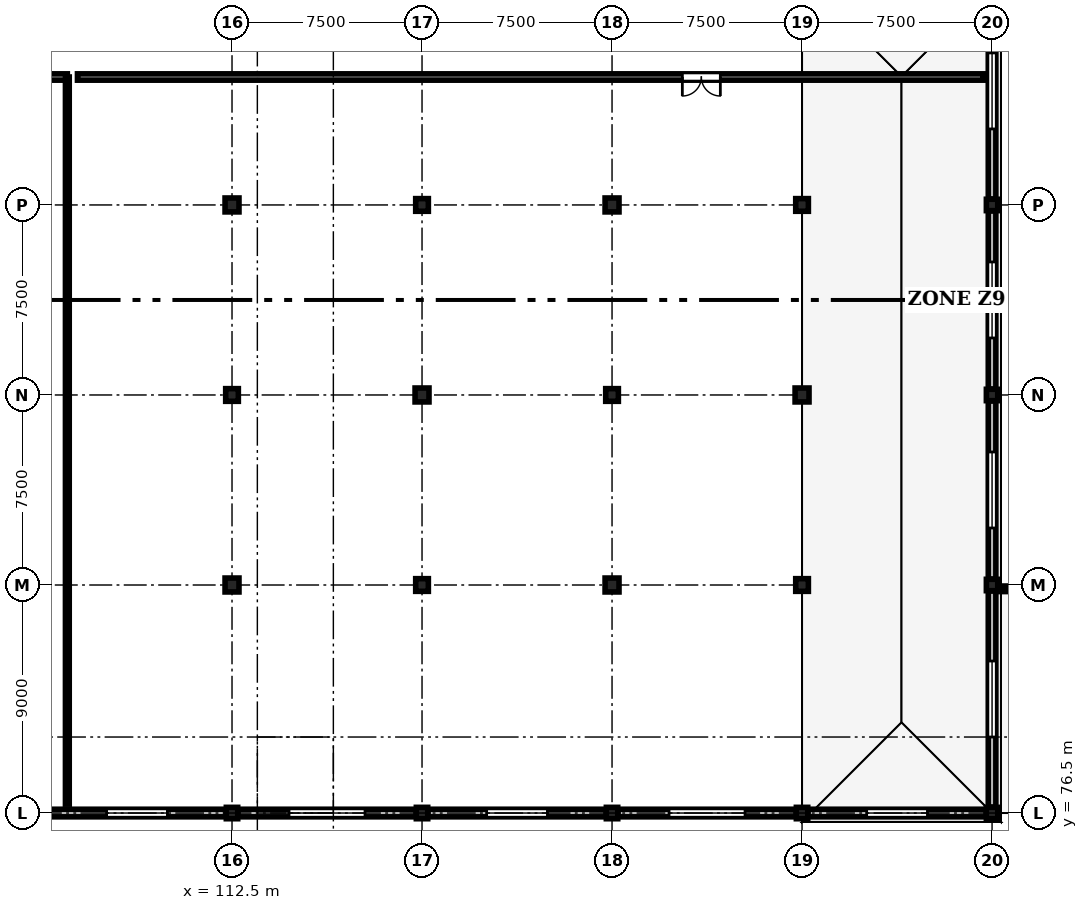
"""IFC4 building model, lengths in metres.
Left out: names, types, materials, properties, quantities, classifications, styles, units other than length and angle.
Written with IfcOpenShell. Run it as: python <this file> out.ifc"""

import sys

from ifc_helpers import new_model, si_unit, direction, frame, frame_2d, origin, origin_2d, place, context, subcontext, project, spatial, rectangle, extrude, element, fill, save


model = new_model("IFC4")
c1 = context("Model", 3, precision=1e-05, world=origin(), true_north=direction((0.0, 1.0)))
c2 = subcontext(c1, "Body", "Model", "MODEL_VIEW")
j1 = project(units=[si_unit("LENGTHUNIT", "METRE"), si_unit("PLANEANGLEUNIT", "RADIAN")], contexts=[c1])
p1 = place(None, origin())
s1 = spatial("IfcSite", under=j1, at=p1, CompositionType="ELEMENT")
p2 = place(p1, origin())
s2 = spatial("IfcBuilding", under=s1, at=p2, CompositionType="ELEMENT")
p3 = place(p2, frame((0.0, 0.0, 14.1)))
s3 = spatial("IfcBuildingStorey", under=s2, at=p3, CompositionType="ELEMENT", Elevation=14.1)
p4 = place(p3, frame((112.5, 76.5, 0.0), z_axis=(0.0, 0.0, 1.0), x_axis=(1.0, 0.0, 0.0)))
e1 = element("IfcColumn", 1, at=p4, inside=s3, PredefinedType="COLUMN", context=c2, shape_type="SweptSolid", body=[
    extrude(rectangle(XDim=0.45, YDim=0.45, at=origin_2d()), origin(), (0.0, 0.0, 1.0), 3.75),
])
p5 = place(p3, frame((112.5, 85.5, 0.0), z_axis=(0.0, 0.0, 1.0), x_axis=(1.0, 0.0, 0.0)))
e2 = element("IfcColumn", 2, at=p5, inside=s3, PredefinedType="COLUMN", context=c2, shape_type="SweptSolid", body=[
    extrude(rectangle(XDim=0.55, YDim=0.55, at=origin_2d()), origin(), (0.0, 0.0, 1.0), 3.75),
])
p6 = place(p3, frame((112.5, 93.0, 0.0), z_axis=(0.0, 0.0, 1.0), x_axis=(1.0, 0.0, 0.0)))
e3 = element("IfcColumn", 3, at=p6, inside=s3, PredefinedType="COLUMN", context=c2, shape_type="SweptSolid", body=[
    extrude(rectangle(XDim=0.5, YDim=0.5, at=origin_2d()), origin(), (0.0, 0.0, 1.0), 3.75),
])
p7 = place(p3, frame((112.5, 100.5, 0.0), z_axis=(0.0, 0.0, 1.0), x_axis=(1.0, 0.0, 0.0)))
e4 = element("IfcColumn", 4, at=p7, inside=s3, PredefinedType="COLUMN", context=c2, shape_type="SweptSolid", body=[
    extrude(rectangle(XDim=0.55, YDim=0.55, at=origin_2d()), origin(), (0.0, 0.0, 1.0), 3.75),
])
p8 = place(p3, frame((120.0, 76.5, 0.0), z_axis=(0.0, 0.0, 1.0), x_axis=(1.0, 0.0, 0.0)))
e5 = element("IfcColumn", 5, at=p8, inside=s3, PredefinedType="COLUMN", context=c2, shape_type="SweptSolid", body=[
    extrude(rectangle(XDim=0.45, YDim=0.45, at=origin_2d()), origin(), (0.0, 0.0, 1.0), 3.75),
])
p9 = place(p3, frame((120.0, 85.5, 0.0), z_axis=(0.0, 0.0, 1.0), x_axis=(1.0, 0.0, 0.0)))
e6 = element("IfcColumn", 6, at=p9, inside=s3, PredefinedType="COLUMN", context=c2, shape_type="SweptSolid", body=[
    extrude(rectangle(XDim=0.5, YDim=0.5, at=origin_2d()), origin(), (0.0, 0.0, 1.0), 3.75),
])
p10 = place(p3, frame((120.0, 93.0, 0.0), z_axis=(0.0, 0.0, 1.0), x_axis=(1.0, 0.0, 0.0)))
e7 = element("IfcColumn", 7, at=p10, inside=s3, PredefinedType="COLUMN", context=c2, shape_type="SweptSolid", body=[
    extrude(rectangle(XDim=0.55, YDim=0.55, at=origin_2d()), origin(), (0.0, 0.0, 1.0), 3.75),
])
p11 = place(p3, frame((120.0, 100.5, 0.0), z_axis=(0.0, 0.0, 1.0), x_axis=(1.0, 0.0, 0.0)))
e8 = element("IfcColumn", 8, at=p11, inside=s3, PredefinedType="COLUMN", context=c2, shape_type="SweptSolid", body=[
    extrude(rectangle(XDim=0.5, YDim=0.5, at=origin_2d()), origin(), (0.0, 0.0, 1.0), 3.75),
])
p12 = place(p3, frame((127.5, 76.5, 0.0), z_axis=(0.0, 0.0, 1.0), x_axis=(1.0, 0.0, 0.0)))
e9 = element("IfcColumn", 9, at=p12, inside=s3, PredefinedType="COLUMN", context=c2, shape_type="SweptSolid", body=[
    extrude(rectangle(XDim=0.45, YDim=0.45, at=origin_2d()), origin(), (0.0, 0.0, 1.0), 3.75),
])
p13 = place(p3, frame((127.5, 85.5, 0.0), z_axis=(0.0, 0.0, 1.0), x_axis=(1.0, 0.0, 0.0)))
e10 = element("IfcColumn", 10, at=p13, inside=s3, PredefinedType="COLUMN", context=c2, shape_type="SweptSolid", body=[
    extrude(rectangle(XDim=0.55, YDim=0.55, at=origin_2d()), origin(), (0.0, 0.0, 1.0), 3.75),
])
p14 = place(p3, frame((127.5, 93.0, 0.0), z_axis=(0.0, 0.0, 1.0), x_axis=(1.0, 0.0, 0.0)))
e11 = element("IfcColumn", 11, at=p14, inside=s3, PredefinedType="COLUMN", context=c2, shape_type="SweptSolid", body=[
    extrude(rectangle(XDim=0.5, YDim=0.5, at=origin_2d()), origin(), (0.0, 0.0, 1.0), 3.75),
])
p15 = place(p3, frame((127.5, 100.5, 0.0), z_axis=(0.0, 0.0, 1.0), x_axis=(1.0, 0.0, 0.0)))
e12 = element("IfcColumn", 12, at=p15, inside=s3, PredefinedType="COLUMN", context=c2, shape_type="SweptSolid", body=[
    extrude(rectangle(XDim=0.55, YDim=0.55, at=origin_2d()), origin(), (0.0, 0.0, 1.0), 3.75),
])
p16 = place(p3, frame((135.0, 76.5, 0.0), z_axis=(0.0, 0.0, 1.0), x_axis=(1.0, 0.0, 0.0)))
e13 = element("IfcColumn", 13, at=p16, inside=s3, PredefinedType="COLUMN", context=c2, shape_type="SweptSolid", body=[
    extrude(rectangle(XDim=0.45, YDim=0.45, at=origin_2d()), origin(), (0.0, 0.0, 1.0), 3.75),
])
p17 = place(p3, frame((135.0, 85.5, 0.0), z_axis=(0.0, 0.0, 1.0), x_axis=(1.0, 0.0, 0.0)))
e14 = element("IfcColumn", 14, at=p17, inside=s3, PredefinedType="COLUMN", context=c2, shape_type="SweptSolid", body=[
    extrude(rectangle(XDim=0.5, YDim=0.5, at=origin_2d()), origin(), (0.0, 0.0, 1.0), 3.75),
])
p18 = place(p3, frame((135.0, 93.0, 0.0), z_axis=(0.0, 0.0, 1.0), x_axis=(1.0, 0.0, 0.0)))
e15 = element("IfcColumn", 15, at=p18, inside=s3, PredefinedType="COLUMN", context=c2, shape_type="SweptSolid", body=[
    extrude(rectangle(XDim=0.55, YDim=0.55, at=origin_2d()), origin(), (0.0, 0.0, 1.0), 3.75),
])
p19 = place(p3, frame((135.0, 100.5, 0.0), z_axis=(0.0, 0.0, 1.0), x_axis=(1.0, 0.0, 0.0)))
e16 = element("IfcColumn", 16, at=p19, inside=s3, PredefinedType="COLUMN", context=c2, shape_type="SweptSolid", body=[
    extrude(rectangle(XDim=0.5, YDim=0.5, at=origin_2d()), origin(), (0.0, 0.0, 1.0), 3.75),
])
for number, where, z_axis, x_axis in (
    (17, (142.5, 76.5, 0.0), (0.0, 0.0, 1.0), (1.0, 0.0, 0.0)),
    (18, (142.5, 85.5, 0.0), (0.0, 0.0, 1.0), (1.0, 0.0, 0.0)),
    (19, (142.5, 93.0, 0.0), (0.0, 0.0, 1.0), (1.0, 0.0, 0.0)),
    (20, (142.5, 100.5, 0.0), (0.0, 0.0, 1.0), (1.0, 0.0, 0.0)),
):
    element("IfcColumn", number, at=place(p3, frame(where, z_axis=z_axis, x_axis=x_axis)), inside=s3, PredefinedType="COLUMN", context=c2, shape_type="SweptSolid", body=[
        extrude(rectangle(XDim=0.45, YDim=0.45, at=origin_2d()), origin(), (0.0, 0.0, 1.0), 3.75),
    ])
p20 = place(p3, frame((112.265, 76.5, 0.0), z_axis=(0.0, 0.0, 1.0), x_axis=(-1.0, 0.0, 0.0)))
e21 = element("IfcWall", 21, at=p20, inside=s3, PredefinedType="STANDARD", context=c2, shape_type="SweptSolid", body=[
    extrude(rectangle(XDim=7.03, YDim=0.3, at=frame_2d((3.515, 0.0))), origin(), (0.0, 0.0, 1.0), 2.87),
])
p21 = place(p20, frame((2.315, 0.0, 1.1)))
e22 = element("IfcOpeningElement", 22, at=p21, cuts=e21, PredefinedType="OPENING", context=c2, shape_type="SweptSolid", body=[
    extrude(rectangle(XDim=2.4, YDim=1.2, at=frame_2d((1.2, 0.6))), frame((0.0, 0.16, 0.0), z_axis=(0.0, -1.0, 0.0), x_axis=(1.0, 0.0, 0.0)), (0.0, 0.0, 1.0), 0.32),
])
p22 = place(p3, frame((119.765, 76.5, 0.0), z_axis=(0.0, 0.0, 1.0), x_axis=(-1.0, 0.0, 0.0)))
e23 = element("IfcWall", 23, at=p22, inside=s3, PredefinedType="STANDARD", context=c2, shape_type="SweptSolid", body=[
    extrude(rectangle(XDim=7.03, YDim=0.3, at=frame_2d((3.515, 0.0))), origin(), (0.0, 0.0, 1.0), 2.87),
])
p23 = place(p22, frame((2.015, 0.0, 1.1)))
e24 = element("IfcOpeningElement", 24, at=p23, cuts=e23, PredefinedType="OPENING", context=c2, shape_type="SweptSolid", body=[
    extrude(rectangle(XDim=3.0, YDim=1.2, at=frame_2d((1.5, 0.6))), frame((0.0, 0.16, 0.0), z_axis=(0.0, -1.0, 0.0), x_axis=(1.0, 0.0, 0.0)), (0.0, 0.0, 1.0), 0.32),
])
p24 = place(p3, frame((127.265, 76.5, 0.0), z_axis=(0.0, 0.0, 1.0), x_axis=(-1.0, 0.0, 0.0)))
e25 = element("IfcWall", 25, at=p24, inside=s3, PredefinedType="STANDARD", context=c2, shape_type="SweptSolid", body=[
    extrude(rectangle(XDim=7.03, YDim=0.3, at=frame_2d((3.515, 0.0))), origin(), (0.0, 0.0, 1.0), 2.87),
])
p25 = place(p24, frame((2.315, 0.0, 1.1)))
e26 = element("IfcOpeningElement", 26, at=p25, cuts=e25, PredefinedType="OPENING", context=c2, shape_type="SweptSolid", body=[
    extrude(rectangle(XDim=2.4, YDim=1.2, at=frame_2d((1.2, 0.6))), frame((0.0, 0.16, 0.0), z_axis=(0.0, -1.0, 0.0), x_axis=(1.0, 0.0, 0.0)), (0.0, 0.0, 1.0), 0.32),
])
p26 = place(p3, frame((134.765, 76.5, 0.0), z_axis=(0.0, 0.0, 1.0), x_axis=(-1.0, 0.0, 0.0)))
e27 = element("IfcWall", 27, at=p26, inside=s3, PredefinedType="STANDARD", context=c2, shape_type="SweptSolid", body=[
    extrude(rectangle(XDim=7.03, YDim=0.3, at=frame_2d((3.515, 0.0))), origin(), (0.0, 0.0, 1.0), 2.87),
])
p27 = place(p26, frame((2.015, 0.0, 1.1)))
e28 = element("IfcOpeningElement", 28, at=p27, cuts=e27, PredefinedType="OPENING", context=c2, shape_type="SweptSolid", body=[
    extrude(rectangle(XDim=3.0, YDim=1.2, at=frame_2d((1.5, 0.6))), frame((0.0, 0.16, 0.0), z_axis=(0.0, -1.0, 0.0), x_axis=(1.0, 0.0, 0.0)), (0.0, 0.0, 1.0), 0.32),
])
p28 = place(p3, frame((142.265, 76.5, 0.0), z_axis=(0.0, 0.0, 1.0), x_axis=(-1.0, 0.0, 0.0)))
e29 = element("IfcWall", 29, at=p28, inside=s3, PredefinedType="STANDARD", context=c2, shape_type="SweptSolid", body=[
    extrude(rectangle(XDim=7.03, YDim=0.3, at=frame_2d((3.515, 0.0))), origin(), (0.0, 0.0, 1.0), 3.47),
])
p29 = place(p28, frame((2.315, 0.0, 1.1)))
e30 = element("IfcOpeningElement", 30, at=p29, cuts=e29, PredefinedType="OPENING", context=c2, shape_type="SweptSolid", body=[
    extrude(rectangle(XDim=2.4, YDim=1.2, at=frame_2d((1.2, 0.6))), frame((0.0, 0.16, 0.0), z_axis=(0.0, -1.0, 0.0), x_axis=(1.0, 0.0, 0.0)), (0.0, 0.0, 1.0), 0.32),
])
p30 = place(p3, frame((142.5, 85.265, 0.0), z_axis=(0.0, 0.0, 1.0), x_axis=(0.0, -1.0, 0.0)))
e31 = element("IfcWall", 31, at=p30, inside=s3, PredefinedType="STANDARD", context=c2, shape_type="SweptSolid", body=[
    extrude(rectangle(XDim=8.53, YDim=0.3, at=frame_2d((4.265, 0.0))), origin(), (0.0, 0.0, 1.0), 3.47),
])
p31 = place(p30, frame((2.765, 0.0, 1.1)))
e32 = element("IfcOpeningElement", 32, at=p31, cuts=e31, PredefinedType="OPENING", context=c2, shape_type="SweptSolid", body=[
    extrude(rectangle(XDim=3.0, YDim=1.2, at=frame_2d((1.5, 0.6))), frame((0.0, 0.16, 0.0), z_axis=(0.0, -1.0, 0.0), x_axis=(1.0, 0.0, 0.0)), (0.0, 0.0, 1.0), 0.32),
])
p32 = place(p3, frame((142.5, 92.765, 0.0), z_axis=(0.0, 0.0, 1.0), x_axis=(0.0, -1.0, 0.0)))
e33 = element("IfcWall", 33, at=p32, inside=s3, PredefinedType="STANDARD", context=c2, shape_type="SweptSolid", body=[
    extrude(rectangle(XDim=7.03, YDim=0.3, at=frame_2d((3.515, 0.0))), origin(), (0.0, 0.0, 1.0), 3.47),
])
p33 = place(p32, frame((2.015, 0.0, 1.1)))
e34 = element("IfcOpeningElement", 34, at=p33, cuts=e33, PredefinedType="OPENING", context=c2, shape_type="SweptSolid", body=[
    extrude(rectangle(XDim=3.0, YDim=1.2, at=frame_2d((1.5, 0.6))), frame((0.0, 0.16, 0.0), z_axis=(0.0, -1.0, 0.0), x_axis=(1.0, 0.0, 0.0)), (0.0, 0.0, 1.0), 0.32),
])
p34 = place(p3, frame((142.5, 100.265, 0.0), z_axis=(0.0, 0.0, 1.0), x_axis=(0.0, -1.0, 0.0)))
e35 = element("IfcWall", 35, at=p34, inside=s3, PredefinedType="STANDARD", context=c2, shape_type="SweptSolid", body=[
    extrude(rectangle(XDim=7.03, YDim=0.3, at=frame_2d((3.515, 0.0))), origin(), (0.0, 0.0, 1.0), 3.47),
])
p35 = place(p34, frame((2.015, 0.0, 1.1)))
e36 = element("IfcOpeningElement", 36, at=p35, cuts=e35, PredefinedType="OPENING", context=c2, shape_type="SweptSolid", body=[
    extrude(rectangle(XDim=3.0, YDim=1.2, at=frame_2d((1.5, 0.6))), frame((0.0, 0.16, 0.0), z_axis=(0.0, -1.0, 0.0), x_axis=(1.0, 0.0, 0.0)), (0.0, 0.0, 1.0), 0.32),
])
p36 = place(p3, frame((142.5, 109.265, 0.0), z_axis=(0.0, 0.0, 1.0), x_axis=(0.0, -1.0, 0.0)))
e37 = element("IfcWall", 37, at=p36, inside=s3, PredefinedType="STANDARD", context=c2, shape_type="SweptSolid", body=[
    extrude(rectangle(XDim=8.53, YDim=0.3, at=frame_2d((4.265, 0.0))), origin(), (0.0, 0.0, 1.0), 3.47),
])
p37 = place(p36, frame((2.765, 0.0, 1.1)))
e38 = element("IfcOpeningElement", 38, at=p37, cuts=e37, PredefinedType="OPENING", context=c2, shape_type="SweptSolid", body=[
    extrude(rectangle(XDim=3.0, YDim=1.2, at=frame_2d((1.5, 0.6))), frame((0.0, 0.16, 0.0), z_axis=(0.0, -1.0, 0.0), x_axis=(1.0, 0.0, 0.0)), (0.0, 0.0, 1.0), 0.32),
])
p38 = place(p3, frame((142.65, 85.35, 0.08), z_axis=(0.0, 0.0, 1.0), x_axis=(1.0, 0.0, 0.0)))
e39 = element("IfcWall", 39, at=p38, inside=s3, PredefinedType="PARAPET", context=c2, shape_type="SweptSolid", body=[
    extrude(rectangle(XDim=14.7, YDim=0.22, at=frame_2d((7.35, 0.0))), origin(), (0.0, 0.0, 1.0), 0.28),
])
p39 = place(p3, frame((106.0, 105.55, 0.0), z_axis=(0.0, 0.0, 1.0), x_axis=(-1.0, 0.0, 0.0)))
e40 = element("IfcWall", 40, at=p39, inside=s3, PredefinedType="STANDARD", context=c2, shape_type="SweptSolid", body=[
    extrude(rectangle(XDim=37.6, YDim=0.25, at=frame_2d((18.8, 0.0))), origin(), (0.0, 0.0, 1.0), 3.455),
])
p40 = place(p39, frame((3.81, 0.0, 0.0)))
e41 = element("IfcOpeningElement", 41, at=p40, cuts=e40, PredefinedType="OPENING", context=c2, shape_type="SweptSolid", body=[
    extrude(rectangle(XDim=1.5, YDim=2.3, at=frame_2d((0.75, 1.15))), frame((0.0, 0.135, 0.0), z_axis=(0.0, -1.0, 0.0), x_axis=(1.0, 0.0, 0.0)), (0.0, 0.0, 1.0), 0.27),
])
p41 = place(p3, frame((142.15, 105.55, 0.0), z_axis=(0.0, 0.0, 1.0), x_axis=(-1.0, 0.0, 0.0)))
e42 = element("IfcWall", 42, at=p41, inside=s3, PredefinedType="STANDARD", context=c2, shape_type="SweptSolid", body=[
    extrude(rectangle(XDim=35.75, YDim=0.25, at=frame_2d((17.875, 0.0))), origin(), (0.0, 0.0, 1.0), 3.455),
])
p42 = place(p41, frame((10.375, 0.0, 0.0)))
e43 = element("IfcOpeningElement", 43, at=p42, cuts=e42, PredefinedType="OPENING", context=c2, shape_type="SweptSolid", body=[
    extrude(rectangle(XDim=1.5, YDim=2.3, at=frame_2d((0.75, 1.15))), frame((0.0, 0.135, 0.0), z_axis=(0.0, -1.0, 0.0), x_axis=(1.0, 0.0, 0.0)), (0.0, 0.0, 1.0), 0.27),
])
p43 = place(p3, frame((106.0, 76.85, 0.0), z_axis=(0.0, 0.0, 1.0), x_axis=(0.0, 1.0, 0.0)))
e44 = element("IfcWall", 44, at=p43, inside=s3, PredefinedType="PARTITIONING", context=c2, shape_type="SweptSolid", body=[
    extrude(rectangle(XDim=28.7, YDim=0.15, at=frame_2d((14.35, 0.0))), origin(), (0.0, 0.0, 1.0), 3.455),
])
p44 = place(p21, origin())
e45 = element("IfcWindow", 45, at=p44, inside=s3, PartitioningType="SINGLE_PANEL", PredefinedType="WINDOW", context=c2, shape_type="SweptSolid", body=[
    extrude(rectangle(XDim=2.4, YDim=1.2, at=frame_2d((1.2, 0.6))), frame((0.0, 0.03, 0.0), z_axis=(0.0, -1.0, 0.0), x_axis=(1.0, 0.0, 0.0)), (0.0, 0.0, 1.0), 0.06),
])
fill(e22, e45)
p45 = place(p23, origin())
e46 = element("IfcWindow", 46, at=p45, inside=s3, PartitioningType="SINGLE_PANEL", PredefinedType="WINDOW", context=c2, shape_type="SweptSolid", body=[
    extrude(rectangle(XDim=3.0, YDim=1.2, at=frame_2d((1.5, 0.6))), frame((0.0, 0.03, 0.0), z_axis=(0.0, -1.0, 0.0), x_axis=(1.0, 0.0, 0.0)), (0.0, 0.0, 1.0), 0.06),
])
fill(e24, e46)
p46 = place(p25, origin())
e47 = element("IfcWindow", 47, at=p46, inside=s3, PartitioningType="SINGLE_PANEL", PredefinedType="WINDOW", context=c2, shape_type="SweptSolid", body=[
    extrude(rectangle(XDim=2.4, YDim=1.2, at=frame_2d((1.2, 0.6))), frame((0.0, 0.03, 0.0), z_axis=(0.0, -1.0, 0.0), x_axis=(1.0, 0.0, 0.0)), (0.0, 0.0, 1.0), 0.06),
])
fill(e26, e47)
p47 = place(p27, origin())
e48 = element("IfcWindow", 48, at=p47, inside=s3, PartitioningType="SINGLE_PANEL", PredefinedType="WINDOW", context=c2, shape_type="SweptSolid", body=[
    extrude(rectangle(XDim=3.0, YDim=1.2, at=frame_2d((1.5, 0.6))), frame((0.0, 0.03, 0.0), z_axis=(0.0, -1.0, 0.0), x_axis=(1.0, 0.0, 0.0)), (0.0, 0.0, 1.0), 0.06),
])
fill(e28, e48)
p48 = place(p29, origin())
e49 = element("IfcWindow", 49, at=p48, inside=s3, PartitioningType="SINGLE_PANEL", PredefinedType="WINDOW", context=c2, shape_type="SweptSolid", body=[
    extrude(rectangle(XDim=2.4, YDim=1.2, at=frame_2d((1.2, 0.6))), frame((0.0, 0.03, 0.0), z_axis=(0.0, -1.0, 0.0), x_axis=(1.0, 0.0, 0.0)), (0.0, 0.0, 1.0), 0.06),
])
fill(e30, e49)
p49 = place(p31, origin())
e50 = element("IfcWindow", 50, at=p49, inside=s3, PartitioningType="SINGLE_PANEL", PredefinedType="WINDOW", context=c2, shape_type="SweptSolid", body=[
    extrude(rectangle(XDim=3.0, YDim=1.2, at=frame_2d((1.5, 0.6))), frame((0.0, 0.03, 0.0), z_axis=(0.0, -1.0, 0.0), x_axis=(1.0, 0.0, 0.0)), (0.0, 0.0, 1.0), 0.06),
])
fill(e32, e50)
p50 = place(p33, origin())
e51 = element("IfcWindow", 51, at=p50, inside=s3, PartitioningType="SINGLE_PANEL", PredefinedType="WINDOW", context=c2, shape_type="SweptSolid", body=[
    extrude(rectangle(XDim=3.0, YDim=1.2, at=frame_2d((1.5, 0.6))), frame((0.0, 0.03, 0.0), z_axis=(0.0, -1.0, 0.0), x_axis=(1.0, 0.0, 0.0)), (0.0, 0.0, 1.0), 0.06),
])
fill(e34, e51)
p51 = place(p35, origin())
e52 = element("IfcWindow", 52, at=p51, inside=s3, PartitioningType="SINGLE_PANEL", PredefinedType="WINDOW", context=c2, shape_type="SweptSolid", body=[
    extrude(rectangle(XDim=3.0, YDim=1.2, at=frame_2d((1.5, 0.6))), frame((0.0, 0.03, 0.0), z_axis=(0.0, -1.0, 0.0), x_axis=(1.0, 0.0, 0.0)), (0.0, 0.0, 1.0), 0.06),
])
fill(e36, e52)
p52 = place(p37, origin())
e53 = element("IfcWindow", 53, at=p52, inside=s3, PartitioningType="SINGLE_PANEL", PredefinedType="WINDOW", context=c2, shape_type="SweptSolid", body=[
    extrude(rectangle(XDim=3.0, YDim=1.2, at=frame_2d((1.5, 0.6))), frame((0.0, 0.03, 0.0), z_axis=(0.0, -1.0, 0.0), x_axis=(1.0, 0.0, 0.0)), (0.0, 0.0, 1.0), 0.06),
])
fill(e38, e53)
p53 = place(p42, origin())
e54 = element("IfcDoor", 54, at=p53, inside=s3, OperationType="DOUBLE_DOOR_SINGLE_SWING", PredefinedType="DOOR", context=c2, shape_type="SweptSolid", body=[
    extrude(rectangle(XDim=1.5, YDim=2.3, at=frame_2d((0.75, 1.15))), frame((0.0, 0.025, 0.0), z_axis=(0.0, -1.0, 0.0), x_axis=(1.0, 0.0, 0.0)), (0.0, 0.0, 1.0), 0.05),
])
fill(e43, e54)
save(model, sys.argv[1])
